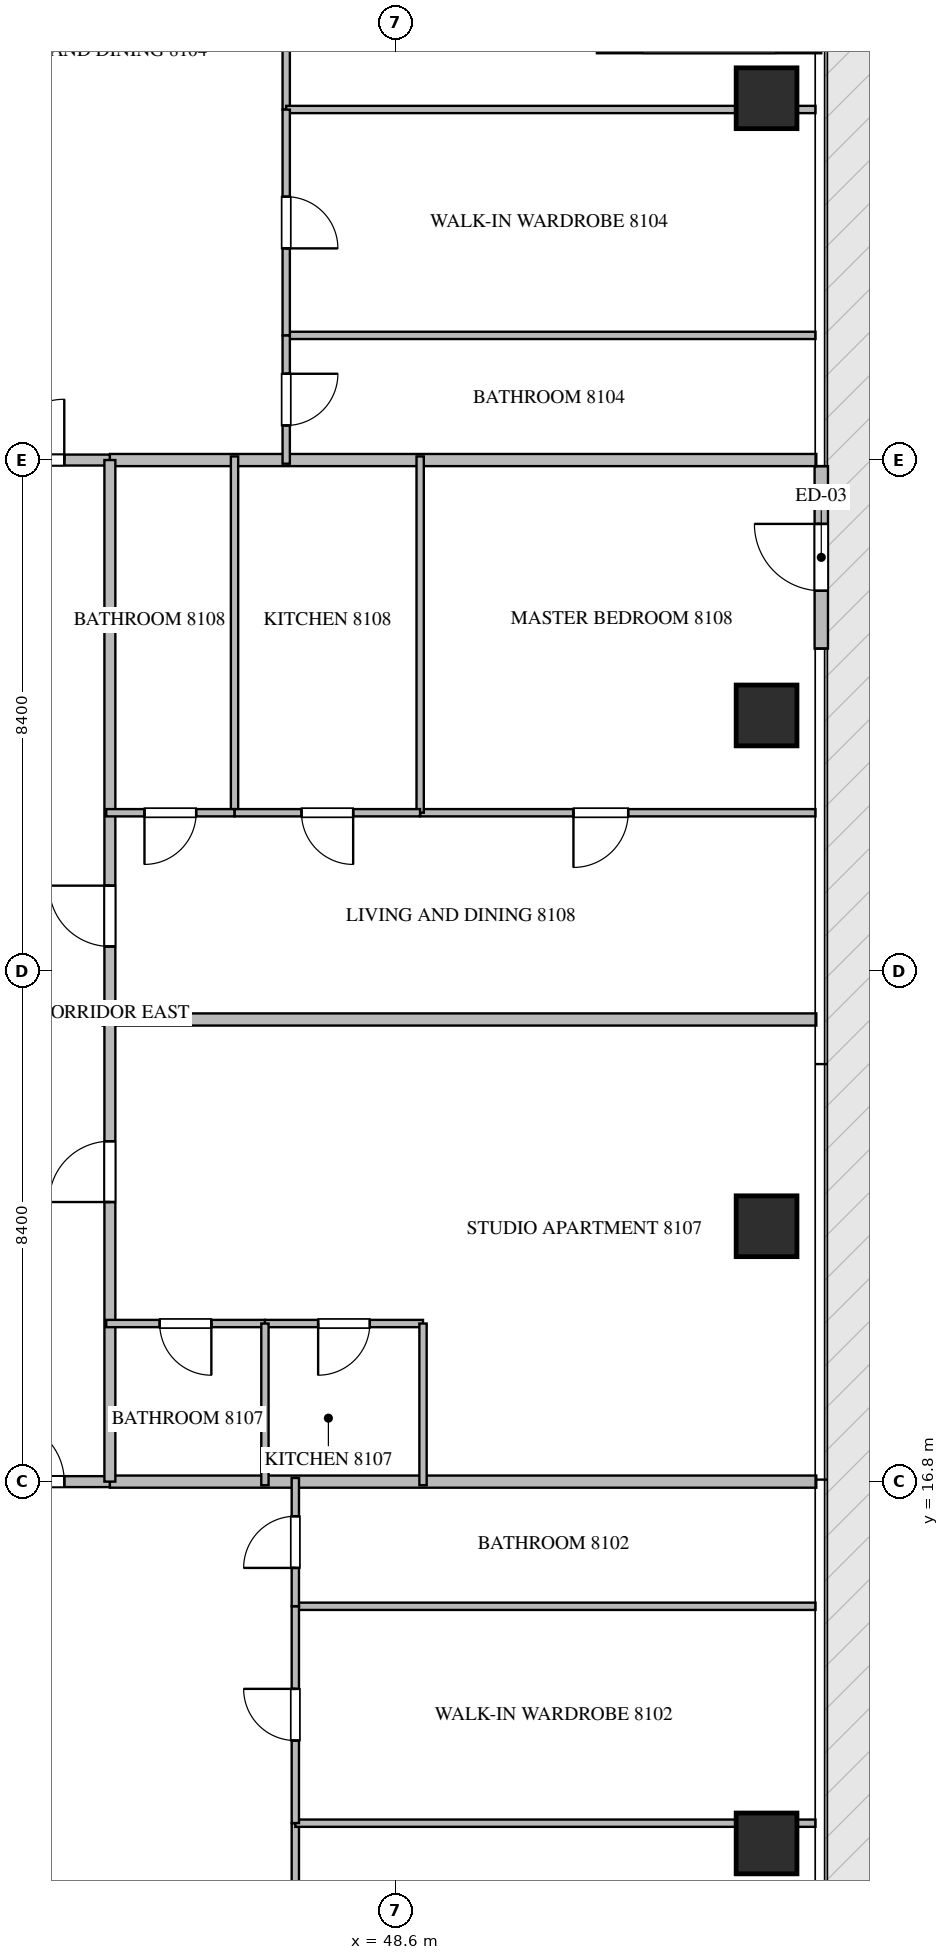
"""IFC4 building model, lengths in metres.
Left out: names, types, materials, properties, quantities, classifications, styles, units other than length and angle.
Written with IfcOpenShell. Run it as: python <this file> out.ifc"""

import sys

from ifc_helpers import new_model, si_unit, direction, frame, frame_2d, origin, origin_2d, place, context, subcontext, project, spatial, rectangle, extrude, source, transform, mapped, element, fill, save


model = new_model("IFC4")
c1 = context("Model", 3, precision=1e-05, world=origin(), true_north=direction((0.0, 1.0)))
c2 = subcontext(c1, "Body", "Model", "MODEL_VIEW")
j1 = project(units=[si_unit("LENGTHUNIT", "METRE"), si_unit("PLANEANGLEUNIT", "RADIAN")], contexts=[c1])
p1 = place(None, origin())
s1 = spatial("IfcSite", under=j1, at=p1, CompositionType="ELEMENT")
p2 = place(p1, origin())
s2 = spatial("IfcBuilding", under=s1, at=p2, CompositionType="ELEMENT")
p3 = place(p2, frame((0.0, 0.0, 325.85)))
s3 = spatial("IfcBuildingStorey", under=s2, at=p3, CompositionType="ELEMENT", Elevation=325.85)
m1 = source(origin(), c2, "Body", "SweptSolid", [
    extrude(rectangle(XDim=1.0, YDim=1.0, at=origin_2d()), origin(), (0.0, 0.0, 1.0), 4.05),
])
for number, where, z_axis, x_axis in (
    (1, (54.7, 10.85, -0.26), (0.0, 0.0, 1.0), (1.0, 0.0, 0.0)),
    (2, (54.7, 21.0, -0.26), (0.0, 0.0, 1.0), (1.0, 0.0, 0.0)),
    (3, (54.7, 29.4, -0.26), (0.0, 0.0, 1.0), (1.0, 0.0, 0.0)),
    (4, (54.7, 39.55, -0.26), (0.0, 0.0, 1.0), (1.0, 0.0, 0.0)),
):
    element("IfcColumn", number, at=place(p3, frame(where, z_axis=z_axis, x_axis=x_axis)), inside=s3, PredefinedType="COLUMN", context=c2, shape_type="MappedRepresentation", body=[
        mapped(m1, transform((0.0, 0.0, 0.0), scale=1.0)),
    ])
p4 = place(p3, frame((55.6, 30.5, 0.0), z_axis=(0.0, 0.0, 1.0), x_axis=(0.0, 1.0, 0.0)))
e5 = element("IfcWall", 5, at=p4, inside=s3, PredefinedType="ELEMENTEDWALL", context=c2, shape_type="SweptSolid", body=[
    extrude(rectangle(XDim=3.0, YDim=0.22, at=frame_2d((1.5, 0.0))), origin(), (0.0, 0.0, 1.0), 3.775),
])
p5 = place(p4, frame((0.95, 0.0, 0.0)))
e6 = element("IfcOpeningElement", 6, at=p5, cuts=e5, PredefinedType="OPENING", context=c2, shape_type="SweptSolid", body=[
    extrude(rectangle(XDim=1.1, YDim=2.2, at=frame_2d((0.55, 1.1))), frame((0.0, 0.12, 0.0), z_axis=(0.0, -1.0, 0.0), x_axis=(1.0, 0.0, 0.0)), (0.0, 0.0, 1.0), 0.24),
])
p6 = place(p3, frame((55.6, 40.4, 0.0), z_axis=(0.0, 0.0, 1.0), x_axis=(-1.0, 0.0, 0.0)))
e7 = element("IfcWall", 7, at=p6, inside=s3, PredefinedType="ELEMENTEDWALL", context=c2, shape_type="SweptSolid", body=[
    extrude(rectangle(XDim=3.69, YDim=0.22, at=frame_2d((1.845, 0.0))), origin(), (0.0, 0.0, 1.0), 3.775),
])
p7 = place(p6, frame((0.745, 0.0, 0.65)))
e8 = element("IfcOpeningElement", 8, at=p7, cuts=e7, PredefinedType="OPENING", context=c2, shape_type="SweptSolid", body=[
    extrude(rectangle(XDim=2.2, YDim=2.4, at=frame_2d((1.1, 1.2))), frame((0.0, 0.12, 0.0), z_axis=(0.0, -1.0, 0.0), x_axis=(1.0, 0.0, 0.0)), (0.0, 0.0, 1.0), 0.24),
])
p8 = place(p3, frame((43.78, 24.4, 0.0), z_axis=(0.0, 0.0, 1.0), x_axis=(1.0, 0.0, 0.0)))
e9 = element("IfcWall", 9, at=p8, inside=s3, PredefinedType="PARTITIONING", context=c2, shape_type="SweptSolid", body=[
    extrude(rectangle(XDim=11.738, YDim=0.2, at=frame_2d((5.869, 0.0))), origin(), (0.0, 0.0, 1.0), 3.79),
])
for number, where, z_axis, x_axis in (
    (10, (43.9, 16.8, 0.0), (0.0, 0.0, 1.0), (1.0, 0.0, 0.0)),
    (11, (43.9, 33.6, 0.0), (0.0, 0.0, 1.0), (1.0, 0.0, 0.0)),
):
    element("IfcWall", number, at=place(p3, frame(where, z_axis=z_axis, x_axis=x_axis)), inside=s3, PredefinedType="PARTITIONING", context=c2, shape_type="SweptSolid", body=[
        extrude(rectangle(XDim=11.618, YDim=0.2, at=frame_2d((5.809, 0.0))), origin(), (0.0, 0.0, 1.0), 3.79),
    ])
p9 = place(p3, frame((41.402, 16.8, 0.0), z_axis=(0.0, 0.0, 1.0), x_axis=(1.0, 0.0, 0.0)))
e12 = element("IfcWall", 12, at=p9, inside=s3, PredefinedType="PARTITIONING", context=c2, shape_type="SweptSolid", body=[
    extrude(rectangle(XDim=2.496, YDim=0.18, at=frame_2d((1.248, 0.0))), origin(), (0.0, 0.0, 1.0), 3.79),
])
p10 = place(p9, frame((0.748, 0.0, 0.0)))
e13 = element("IfcOpeningElement", 13, at=p10, cuts=e12, PredefinedType="OPENING", context=c2, shape_type="SweptSolid", body=[
    extrude(rectangle(XDim=1.0, YDim=2.15, at=frame_2d((0.5, 1.075))), frame((0.0, 0.1, 0.0), z_axis=(0.0, -1.0, 0.0), x_axis=(1.0, 0.0, 0.0)), (0.0, 0.0, 1.0), 0.2),
])
p11 = place(p3, frame((41.402, 33.6, 0.0), z_axis=(0.0, 0.0, 1.0), x_axis=(1.0, 0.0, 0.0)))
e14 = element("IfcWall", 14, at=p11, inside=s3, PredefinedType="PARTITIONING", context=c2, shape_type="SweptSolid", body=[
    extrude(rectangle(XDim=2.496, YDim=0.18, at=frame_2d((1.248, 0.0))), origin(), (0.0, 0.0, 1.0), 3.79),
])
p12 = place(p11, frame((0.748, 0.0, 0.0)))
e15 = element("IfcOpeningElement", 15, at=p12, cuts=e14, PredefinedType="OPENING", context=c2, shape_type="SweptSolid", body=[
    extrude(rectangle(XDim=1.0, YDim=2.15, at=frame_2d((0.5, 1.075))), frame((0.0, 0.1, 0.0), z_axis=(0.0, -1.0, 0.0), x_axis=(1.0, 0.0, 0.0)), (0.0, 0.0, 1.0), 0.2),
])
p13 = place(p3, frame((43.9, 16.8, 0.0), z_axis=(0.0, 0.0, 1.0), x_axis=(0.0, 1.0, 0.0)))
e16 = element("IfcWall", 16, at=p13, inside=s3, PredefinedType="PARTITIONING", context=c2, shape_type="SweptSolid", body=[
    extrude(rectangle(XDim=16.8, YDim=0.18, at=frame_2d((8.4, 0.0))), origin(), (0.0, 0.0, 1.0), 3.79),
])
p14 = place(p13, frame((4.598, 0.0, 0.0)))
e17 = element("IfcOpeningElement", 17, at=p14, cuts=e16, PredefinedType="OPENING", context=c2, shape_type="SweptSolid", body=[
    extrude(rectangle(XDim=1.0, YDim=2.15, at=frame_2d((0.5, 1.075))), frame((0.0, 0.1, 0.0), z_axis=(0.0, -1.0, 0.0), x_axis=(1.0, 0.0, 0.0)), (0.0, 0.0, 1.0), 0.2),
])
p15 = place(p13, frame((8.801, 0.0, 0.0)))
e18 = element("IfcOpeningElement", 18, at=p15, cuts=e16, PredefinedType="OPENING", context=c2, shape_type="SweptSolid", body=[
    extrude(rectangle(XDim=1.0, YDim=2.15, at=frame_2d((0.5, 1.075))), frame((0.0, 0.1, 0.0), z_axis=(0.0, -1.0, 0.0), x_axis=(1.0, 0.0, 0.0)), (0.0, 0.0, 1.0), 0.2),
])
p16 = place(p3, frame((46.95, 2.495, 0.0), z_axis=(0.0, 0.0, 1.0), x_axis=(0.0, 1.0, 0.0)))
e19 = element("IfcWall", 19, at=p16, inside=s3, PredefinedType="PARTITIONING", context=c2, shape_type="SweptSolid", body=[
    extrude(rectangle(XDim=8.688, YDim=0.12, at=frame_2d((4.344, 0.0))), origin(), (0.0, 0.0, 1.0), 3.292),
])
p17 = place(p16, frame((4.283, 0.0, 0.0)))
e20 = element("IfcOpeningElement", 20, at=p17, cuts=e19, PredefinedType="OPENING", context=c2, shape_type="SweptSolid", body=[
    extrude(rectangle(XDim=0.9, YDim=2.1, at=frame_2d((0.45, 1.05))), frame((0.0, 0.07, 0.0), z_axis=(0.0, -1.0, 0.0), x_axis=(1.0, 0.0, 0.0)), (0.0, 0.0, 1.0), 0.14),
])
for number, where, z_axis, x_axis in (
    (21, (46.95, 11.183, 0.0), (0.0, 0.0, 1.0), (1.0, 0.0, 0.0)),
    (22, (46.95, 14.75, 0.0), (0.0, 0.0, 1.0), (1.0, 0.0, 0.0)),
):
    element("IfcWall", number, at=place(p3, frame(where, z_axis=z_axis, x_axis=x_axis)), inside=s3, PredefinedType="PARTITIONING", context=c2, shape_type="SweptSolid", body=[
        extrude(rectangle(XDim=8.555, YDim=0.12, at=frame_2d((4.277, 0.0))), origin(), (0.0, 0.0, 1.0), 3.79),
    ])
p18 = place(p3, frame((46.95, 11.185, 0.0), z_axis=(0.0, 0.0, 1.0), x_axis=(0.0, 1.0, 0.0)))
e23 = element("IfcWall", 23, at=p18, inside=s3, PredefinedType="PARTITIONING", context=c2, shape_type="SweptSolid", body=[
    extrude(rectangle(XDim=3.565, YDim=0.12, at=frame_2d((1.782, 0.0))), origin(), (0.0, 0.0, 1.0), 3.372),
])
p19 = place(p18, frame((1.357, 0.0, 0.0)))
e24 = element("IfcOpeningElement", 24, at=p19, cuts=e23, PredefinedType="OPENING", context=c2, shape_type="SweptSolid", body=[
    extrude(rectangle(XDim=0.85, YDim=2.1, at=frame_2d((0.425, 1.05))), frame((0.0, 0.07, 0.0), z_axis=(0.0, -1.0, 0.0), x_axis=(1.0, 0.0, 0.0)), (0.0, 0.0, 1.0), 0.14),
])
p20 = place(p3, frame((46.95, 14.752, 0.0), z_axis=(0.0, 0.0, 1.0), x_axis=(0.0, 1.0, 0.0)))
e25 = element("IfcWall", 25, at=p20, inside=s3, PredefinedType="PARTITIONING", context=c2, shape_type="SweptSolid", body=[
    extrude(rectangle(XDim=2.108, YDim=0.12, at=frame_2d((1.054, 0.0))), origin(), (0.0, 0.0, 1.0), 3.372),
])
p21 = place(p20, frame((0.629, 0.0, 0.0)))
e26 = element("IfcOpeningElement", 26, at=p21, cuts=e25, PredefinedType="OPENING", context=c2, shape_type="SweptSolid", body=[
    extrude(rectangle(XDim=0.85, YDim=2.1, at=frame_2d((0.425, 1.05))), frame((0.0, 0.07, 0.0), z_axis=(0.0, -1.0, 0.0), x_axis=(1.0, 0.0, 0.0)), (0.0, 0.0, 1.0), 0.14),
])
p22 = place(p3, frame((46.8, 47.905, 0.0), z_axis=(0.0, 0.0, 1.0), x_axis=(0.0, -1.0, 0.0)))
e27 = element("IfcWall", 27, at=p22, inside=s3, PredefinedType="PARTITIONING", context=c2, shape_type="SweptSolid", body=[
    extrude(rectangle(XDim=8.54, YDim=0.12, at=frame_2d((4.27, 0.0))), origin(), (0.0, 0.0, 1.0), 3.79),
])
p23 = place(p22, frame((4.202, 0.0, 0.0)))
e28 = element("IfcOpeningElement", 28, at=p23, cuts=e27, PredefinedType="OPENING", context=c2, shape_type="SweptSolid", body=[
    extrude(rectangle(XDim=0.9, YDim=2.1, at=frame_2d((0.45, 1.05))), frame((0.0, 0.07, 0.0), z_axis=(0.0, -1.0, 0.0), x_axis=(1.0, 0.0, 0.0)), (0.0, 0.0, 1.0), 0.14),
])
p24 = place(p3, frame((46.8, 39.365, 0.0), z_axis=(0.0, 0.0, 1.0), x_axis=(1.0, 0.0, 0.0)))
e29 = element("IfcWall", 29, at=p24, inside=s3, PredefinedType="PARTITIONING", context=c2, shape_type="SweptSolid", body=[
    extrude(rectangle(XDim=8.705, YDim=0.12, at=frame_2d((4.353, 0.0))), origin(), (0.0, 0.0, 1.0), 3.292),
])
p25 = place(p3, frame((46.8, 35.65, 0.0), z_axis=(0.0, 0.0, 1.0), x_axis=(1.0, 0.0, 0.0)))
e30 = element("IfcWall", 30, at=p25, inside=s3, PredefinedType="PARTITIONING", context=c2, shape_type="SweptSolid", body=[
    extrude(rectangle(XDim=8.705, YDim=0.12, at=frame_2d((4.353, 0.0))), origin(), (0.0, 0.0, 1.0), 3.79),
])
p26 = place(p3, frame((46.8, 39.363, 0.0), z_axis=(0.0, 0.0, 1.0), x_axis=(0.0, -1.0, 0.0)))
e31 = element("IfcWall", 31, at=p26, inside=s3, PredefinedType="PARTITIONING", context=c2, shape_type="SweptSolid", body=[
    extrude(rectangle(XDim=3.713, YDim=0.12, at=frame_2d((1.856, 0.0))), origin(), (0.0, 0.0, 1.0), 3.79),
])
p27 = place(p26, frame((1.432, 0.0, 0.0)))
e32 = element("IfcOpeningElement", 32, at=p27, cuts=e31, PredefinedType="OPENING", context=c2, shape_type="SweptSolid", body=[
    extrude(rectangle(XDim=0.85, YDim=2.1, at=frame_2d((0.425, 1.05))), frame((0.0, 0.07, 0.0), z_axis=(0.0, -1.0, 0.0), x_axis=(1.0, 0.0, 0.0)), (0.0, 0.0, 1.0), 0.14),
])
p28 = place(p3, frame((46.8, 35.648, 0.0), z_axis=(0.0, 0.0, 1.0), x_axis=(0.0, -1.0, 0.0)))
e33 = element("IfcWall", 33, at=p28, inside=s3, PredefinedType="PARTITIONING", context=c2, shape_type="SweptSolid", body=[
    extrude(rectangle(XDim=2.108, YDim=0.12, at=frame_2d((1.054, 0.0))), origin(), (0.0, 0.0, 1.0), 3.79),
])
p29 = place(p28, frame((0.629, 0.0, 0.0)))
e34 = element("IfcOpeningElement", 34, at=p29, cuts=e33, PredefinedType="OPENING", context=c2, shape_type="SweptSolid", body=[
    extrude(rectangle(XDim=0.85, YDim=2.1, at=frame_2d((0.425, 1.05))), frame((0.0, 0.07, 0.0), z_axis=(0.0, -1.0, 0.0), x_axis=(1.0, 0.0, 0.0)), (0.0, 0.0, 1.0), 0.14),
])
p30 = place(p3, frame((49.05, 19.4, 0.0), z_axis=(0.0, 0.0, 1.0), x_axis=(-1.0, 0.0, 0.0)))
e35 = element("IfcWall", 35, at=p30, inside=s3, PredefinedType="PARTITIONING", context=c2, shape_type="SweptSolid", body=[
    extrude(rectangle(XDim=2.6, YDim=0.12, at=frame_2d((1.3, 0.0))), origin(), (0.0, 0.0, 1.0), 3.79),
])
p31 = place(p30, frame((0.875, 0.0, 0.0)))
e36 = element("IfcOpeningElement", 36, at=p31, cuts=e35, PredefinedType="OPENING", context=c2, shape_type="SweptSolid", body=[
    extrude(rectangle(XDim=0.85, YDim=2.1, at=frame_2d((0.425, 1.05))), frame((0.0, 0.07, 0.0), z_axis=(0.0, -1.0, 0.0), x_axis=(1.0, 0.0, 0.0)), (0.0, 0.0, 1.0), 0.14),
])
p32 = place(p3, frame((46.448, 19.4, 0.0), z_axis=(0.0, 0.0, 1.0), x_axis=(-1.0, 0.0, 0.0)))
e37 = element("IfcWall", 37, at=p32, inside=s3, PredefinedType="PARTITIONING", context=c2, shape_type="SweptSolid", body=[
    extrude(rectangle(XDim=2.608, YDim=0.12, at=frame_2d((1.304, 0.0))), origin(), (0.0, 0.0, 1.0), 3.79),
])
p33 = place(p32, frame((0.879, 0.0, 0.0)))
e38 = element("IfcOpeningElement", 38, at=p33, cuts=e37, PredefinedType="OPENING", context=c2, shape_type="SweptSolid", body=[
    extrude(rectangle(XDim=0.85, YDim=2.1, at=frame_2d((0.425, 1.05))), frame((0.0, 0.07, 0.0), z_axis=(0.0, -1.0, 0.0), x_axis=(1.0, 0.0, 0.0)), (0.0, 0.0, 1.0), 0.14),
])
for number, where, z_axis, x_axis in (
    (39, (46.45, 16.74, 0.0), (0.0, 0.0, 1.0), (0.0, 1.0, 0.0)),
    (40, (49.05, 16.74, 0.0), (0.0, 0.0, 1.0), (0.0, 1.0, 0.0)),
):
    element("IfcWall", number, at=place(p3, frame(where, z_axis=z_axis, x_axis=x_axis)), inside=s3, PredefinedType="PARTITIONING", context=c2, shape_type="SweptSolid", body=[
        extrude(rectangle(XDim=2.66, YDim=0.12, at=frame_2d((1.33, 0.0))), origin(), (0.0, 0.0, 1.0), 3.79),
    ])
p34 = place(p3, frame((55.505, 27.8, 0.0), z_axis=(0.0, 0.0, 1.0), x_axis=(-1.0, 0.0, 0.0)))
e41 = element("IfcWall", 41, at=p34, inside=s3, PredefinedType="PARTITIONING", context=c2, shape_type="SweptSolid", body=[
    extrude(rectangle(XDim=6.502, YDim=0.12, at=frame_2d((3.251, 0.0))), origin(), (0.0, 0.0, 1.0), 3.79),
])
p35 = place(p34, frame((3.081, 0.0, 0.0)))
e42 = element("IfcOpeningElement", 42, at=p35, cuts=e41, PredefinedType="OPENING", context=c2, shape_type="SweptSolid", body=[
    extrude(rectangle(XDim=0.9, YDim=2.1, at=frame_2d((0.45, 1.05))), frame((0.0, 0.07, 0.0), z_axis=(0.0, -1.0, 0.0), x_axis=(1.0, 0.0, 0.0)), (0.0, 0.0, 1.0), 0.14),
])
for number, where, z_axis, x_axis in (
    (43, (49.003, 27.8, 0.0), (0.0, 0.0, 1.0), (0.0, 1.0, 0.0)),
    (44, (45.95, 27.8, 0.0), (0.0, 0.0, 1.0), (0.0, 1.0, 0.0)),
):
    element("IfcWall", number, at=place(p3, frame(where, z_axis=z_axis, x_axis=x_axis)), inside=s3, PredefinedType="PARTITIONING", context=c2, shape_type="SweptSolid", body=[
        extrude(rectangle(XDim=5.86, YDim=0.12, at=frame_2d((2.93, 0.0))), origin(), (0.0, 0.0, 1.0), 3.79),
    ])
p36 = place(p3, frame((49.001, 27.8, 0.0), z_axis=(0.0, 0.0, 1.0), x_axis=(-1.0, 0.0, 0.0)))
e45 = element("IfcWall", 45, at=p36, inside=s3, PredefinedType="PARTITIONING", context=c2, shape_type="SweptSolid", body=[
    extrude(rectangle(XDim=3.051, YDim=0.12, at=frame_2d((1.525, 0.0))), origin(), (0.0, 0.0, 1.0), 3.79),
])
p37 = place(p36, frame((1.1, 0.0, 0.0)))
e46 = element("IfcOpeningElement", 46, at=p37, cuts=e45, PredefinedType="OPENING", context=c2, shape_type="SweptSolid", body=[
    extrude(rectangle(XDim=0.85, YDim=2.1, at=frame_2d((0.425, 1.05))), frame((0.0, 0.07, 0.0), z_axis=(0.0, -1.0, 0.0), x_axis=(1.0, 0.0, 0.0)), (0.0, 0.0, 1.0), 0.14),
])
p38 = place(p3, frame((45.948, 27.8, 0.0), z_axis=(0.0, 0.0, 1.0), x_axis=(-1.0, 0.0, 0.0)))
e47 = element("IfcWall", 47, at=p38, inside=s3, PredefinedType="PARTITIONING", context=c2, shape_type="SweptSolid", body=[
    extrude(rectangle(XDim=2.108, YDim=0.12, at=frame_2d((1.054, 0.0))), origin(), (0.0, 0.0, 1.0), 3.79),
])
p39 = place(p38, frame((0.629, 0.0, 0.0)))
e48 = element("IfcOpeningElement", 48, at=p39, cuts=e47, PredefinedType="OPENING", context=c2, shape_type="SweptSolid", body=[
    extrude(rectangle(XDim=0.85, YDim=2.1, at=frame_2d((0.425, 1.05))), frame((0.0, 0.07, 0.0), z_axis=(0.0, -1.0, 0.0), x_axis=(1.0, 0.0, 0.0)), (0.0, 0.0, 1.0), 0.14),
])
m2 = source(origin(), c2, "Body", "SweptSolid", [
    extrude(rectangle(XDim=1.1, YDim=2.2, at=frame_2d((0.55, 1.1))), frame((0.0, 0.025, 0.0), z_axis=(0.0, -1.0, 0.0), x_axis=(1.0, 0.0, 0.0)), (0.0, 0.0, 1.0), 0.05),
])
p40 = place(p5, origin())
e49 = element("IfcDoor", 49, at=p40, inside=s3, OperationType="SINGLE_SWING_RIGHT", PredefinedType="DOOR", context=c2, shape_type="MappedRepresentation", body=[
    mapped(m2, transform((0.0, 0.0, 0.0), scale=1.0)),
])
fill(e6, e49)
m3 = source(origin(), c2, "Body", "SweptSolid", [
    extrude(rectangle(XDim=1.0, YDim=2.15, at=frame_2d((0.5, 1.075))), frame((0.0, 0.025, 0.0), z_axis=(0.0, -1.0, 0.0), x_axis=(1.0, 0.0, 0.0)), (0.0, 0.0, 1.0), 0.05),
])
p41 = place(p10, origin())
e50 = element("IfcDoor", 50, at=p41, inside=s3, OperationType="SINGLE_SWING_LEFT", PredefinedType="DOOR", context=c2, shape_type="MappedRepresentation", body=[
    mapped(m3, transform((0.0, 0.0, 0.0), scale=1.0)),
])
fill(e13, e50)
p42 = place(p12, origin())
e51 = element("IfcDoor", 51, at=p42, inside=s3, OperationType="SINGLE_SWING_RIGHT", PredefinedType="DOOR", context=c2, shape_type="MappedRepresentation", body=[
    mapped(m3, transform((0.0, 0.0, 0.0), scale=1.0)),
])
fill(e15, e51)
p43 = place(p14, origin())
e52 = element("IfcDoor", 52, at=p43, inside=s3, OperationType="SINGLE_SWING_LEFT", PredefinedType="DOOR", context=c2, shape_type="MappedRepresentation", body=[
    mapped(m3, transform((0.0, 0.0, 0.0), scale=1.0)),
])
fill(e17, e52)
p44 = place(p15, origin())
e53 = element("IfcDoor", 53, at=p44, inside=s3, OperationType="SINGLE_SWING_RIGHT", PredefinedType="DOOR", context=c2, shape_type="MappedRepresentation", body=[
    mapped(m3, transform((0.0, 0.0, 0.0), scale=1.0)),
])
fill(e18, e53)
m4 = source(origin(), c2, "Body", "SweptSolid", [
    extrude(rectangle(XDim=0.85, YDim=2.1, at=frame_2d((0.425, 1.05))), frame((0.0, 0.025, 0.0), z_axis=(0.0, -1.0, 0.0), x_axis=(1.0, 0.0, 0.0)), (0.0, 0.0, 1.0), 0.05),
])
p45 = place(p19, origin())
e54 = element("IfcDoor", 54, at=p45, inside=s3, OperationType="SINGLE_SWING_RIGHT", PredefinedType="DOOR", context=c2, shape_type="MappedRepresentation", body=[
    mapped(m4, transform((0.0, 0.0, 0.0), scale=1.0)),
])
fill(e24, e54)
p46 = place(p21, origin())
e55 = element("IfcDoor", 55, at=p46, inside=s3, OperationType="SINGLE_SWING_LEFT", PredefinedType="DOOR", context=c2, shape_type="MappedRepresentation", body=[
    mapped(m4, transform((0.0, 0.0, 0.0), scale=1.0)),
])
fill(e26, e55)
p47 = place(p27, origin())
e56 = element("IfcDoor", 56, at=p47, inside=s3, OperationType="SINGLE_SWING_RIGHT", PredefinedType="DOOR", context=c2, shape_type="MappedRepresentation", body=[
    mapped(m4, transform((0.0, 0.0, 0.0), scale=1.0)),
])
fill(e32, e56)
p48 = place(p29, origin())
e57 = element("IfcDoor", 57, at=p48, inside=s3, OperationType="SINGLE_SWING_LEFT", PredefinedType="DOOR", context=c2, shape_type="MappedRepresentation", body=[
    mapped(m4, transform((0.0, 0.0, 0.0), scale=1.0)),
])
fill(e34, e57)
p49 = place(p31, origin())
e58 = element("IfcDoor", 58, at=p49, inside=s3, OperationType="SINGLE_SWING_RIGHT", PredefinedType="DOOR", context=c2, shape_type="MappedRepresentation", body=[
    mapped(m4, transform((0.0, 0.0, 0.0), scale=1.0)),
])
fill(e36, e58)
p50 = place(p33, origin())
e59 = element("IfcDoor", 59, at=p50, inside=s3, OperationType="SINGLE_SWING_LEFT", PredefinedType="DOOR", context=c2, shape_type="MappedRepresentation", body=[
    mapped(m4, transform((0.0, 0.0, 0.0), scale=1.0)),
])
fill(e38, e59)
m5 = source(origin(), c2, "Body", "SweptSolid", [
    extrude(rectangle(XDim=0.9, YDim=2.1, at=frame_2d((0.45, 1.05))), frame((0.0, 0.025, 0.0), z_axis=(0.0, -1.0, 0.0), x_axis=(1.0, 0.0, 0.0)), (0.0, 0.0, 1.0), 0.05),
])
p51 = place(p35, origin())
e60 = element("IfcDoor", 60, at=p51, inside=s3, OperationType="SINGLE_SWING_RIGHT", PredefinedType="DOOR", context=c2, shape_type="MappedRepresentation", body=[
    mapped(m5, transform((0.0, 0.0, 0.0), scale=1.0)),
])
fill(e42, e60)
p52 = place(p37, origin())
e61 = element("IfcDoor", 61, at=p52, inside=s3, OperationType="SINGLE_SWING_LEFT", PredefinedType="DOOR", context=c2, shape_type="MappedRepresentation", body=[
    mapped(m4, transform((0.0, 0.0, 0.0), scale=1.0)),
])
fill(e46, e61)
p53 = place(p39, origin())
e62 = element("IfcDoor", 62, at=p53, inside=s3, OperationType="SINGLE_SWING_RIGHT", PredefinedType="DOOR", context=c2, shape_type="MappedRepresentation", body=[
    mapped(m4, transform((0.0, 0.0, 0.0), scale=1.0)),
])
fill(e48, e62)
save(model, sys.argv[1])
